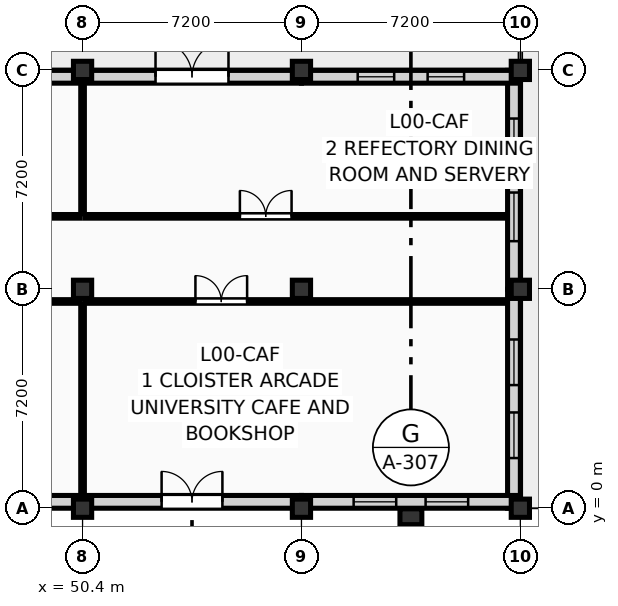
"""IFC4 building model, lengths in metres.
Left out: names, types, materials, properties, quantities, classifications, styles, units other than length and angle.
Written with IfcOpenShell. Run it as: python <this file> out.ifc"""

import sys

from ifc_helpers import new_model, si_unit, direction, frame, frame_2d, origin, origin_2d, place, context, subcontext, project, spatial, rectangle, extrude, element, fill, save


model = new_model("IFC4")
c1 = context("Model", 3, precision=1e-05, world=origin(), true_north=direction((0.0, 1.0)))
c2 = subcontext(c1, "Body", "Model", "MODEL_VIEW")
j1 = project(units=[si_unit("LENGTHUNIT", "METRE"), si_unit("PLANEANGLEUNIT", "RADIAN")], contexts=[c1])
p1 = place(None, origin())
s1 = spatial("IfcSite", under=j1, at=p1, CompositionType="ELEMENT")
p2 = place(p1, origin())
s2 = spatial("IfcBuilding", under=s1, at=p2, CompositionType="ELEMENT")
p3 = place(p2, origin())
s3 = spatial("IfcBuildingStorey", under=s2, at=p3, CompositionType="ELEMENT", Elevation=0.0)
for number, where, z_axis, x_axis in (
    (1, (50.4, 0.0, 0.0), (0.0, 0.0, 1.0), (1.0, 0.0, 0.0)),
    (2, (50.4, 7.2, 0.0), (0.0, 0.0, 1.0), (1.0, 0.0, 0.0)),
    (3, (50.4, 14.4, 0.0), (0.0, 0.0, 1.0), (1.0, 0.0, 0.0)),
    (4, (57.6, 0.0, 0.0), (0.0, 0.0, 1.0), (1.0, 0.0, 0.0)),
    (5, (57.6, 7.2, 0.0), (0.0, 0.0, 1.0), (1.0, 0.0, 0.0)),
    (6, (57.6, 14.4, 0.0), (0.0, 0.0, 1.0), (1.0, 0.0, 0.0)),
    (7, (64.8, 0.0, 0.0), (0.0, 0.0, 1.0), (1.0, 0.0, 0.0)),
    (8, (64.8, 7.2, 0.0), (0.0, 0.0, 1.0), (1.0, 0.0, 0.0)),
    (9, (64.8, 14.4, 0.0), (0.0, 0.0, 1.0), (1.0, 0.0, 0.0)),
):
    element("IfcColumn", number, at=place(p3, frame(where, z_axis=z_axis, x_axis=x_axis)), inside=s3, PredefinedType="COLUMN", context=c2, shape_type="SweptSolid", body=[
        extrude(rectangle(XDim=0.6, YDim=0.6, at=origin_2d()), origin(), (0.0, 0.0, 1.0), 4.5),
    ])
p4 = place(p3, frame((61.2, -0.28, 0.0), z_axis=(0.0, 0.0, 1.0), x_axis=(0.0, 1.0, 0.0)))
e10 = element("IfcColumn", 10, at=p4, inside=s3, PredefinedType="PILASTER", context=c2, shape_type="SweptSolid", body=[
    extrude(rectangle(XDim=0.52, YDim=0.72, at=origin_2d()), origin(), (0.0, 0.0, 1.0), 4.5),
])
p5 = place(p3, frame((64.59, 7.2, 0.0), z_axis=(0.0, 0.0, 1.0), x_axis=(0.0, 1.0, 0.0)))
e11 = element("IfcWall", 11, at=p5, inside=s3, PredefinedType="SOLIDWALL", context=c2, shape_type="SweptSolid", body=[
    extrude(rectangle(XDim=7.2, YDim=0.42, at=frame_2d((3.6, 0.0))), origin(), (0.0, 0.0, 1.0), 3.62),
])
p6 = place(p5, frame((1.583, 0.0, 0.45)))
e12 = element("IfcOpeningElement", 12, at=p6, cuts=e11, PredefinedType="OPENING", context=c2, shape_type="SweptSolid", body=[
    extrude(rectangle(XDim=1.6, YDim=2.65, at=frame_2d((0.8, 1.325))), frame((0.0, 0.222, 0.0), z_axis=(0.0, -1.0, 0.0), x_axis=(1.0, 0.0, 0.0)), (0.0, 0.0, 1.0), 0.444),
])
p7 = place(p5, frame((4.017, 0.0, 0.45)))
e13 = element("IfcOpeningElement", 13, at=p7, cuts=e11, PredefinedType="OPENING", context=c2, shape_type="SweptSolid", body=[
    extrude(rectangle(XDim=1.6, YDim=2.65, at=frame_2d((0.8, 1.325))), frame((0.0, 0.222, 0.0), z_axis=(0.0, -1.0, 0.0), x_axis=(1.0, 0.0, 0.0)), (0.0, 0.0, 1.0), 0.444),
])
p8 = place(p3, frame((64.59, 0.0, 0.0), z_axis=(0.0, 0.0, 1.0), x_axis=(0.0, 1.0, 0.0)))
e14 = element("IfcWall", 14, at=p8, inside=s3, PredefinedType="SOLIDWALL", context=c2, shape_type="SweptSolid", body=[
    extrude(rectangle(XDim=7.2, YDim=0.42, at=frame_2d((3.6, 0.0))), origin(), (0.0, 0.0, 1.0), 3.62),
])
p9 = place(p8, frame((1.65, 0.0, 0.45)))
e15 = element("IfcOpeningElement", 15, at=p9, cuts=e14, PredefinedType="OPENING", context=c2, shape_type="SweptSolid", body=[
    extrude(rectangle(XDim=1.5, YDim=2.6, at=frame_2d((0.75, 1.3))), frame((0.0, 0.222, 0.0), z_axis=(0.0, -1.0, 0.0), x_axis=(1.0, 0.0, 0.0)), (0.0, 0.0, 1.0), 0.444),
])
p10 = place(p8, frame((4.05, 0.0, 0.45)))
e16 = element("IfcOpeningElement", 16, at=p10, cuts=e14, PredefinedType="OPENING", context=c2, shape_type="SweptSolid", body=[
    extrude(rectangle(XDim=1.5, YDim=2.6, at=frame_2d((0.75, 1.3))), frame((0.0, 0.222, 0.0), z_axis=(0.0, -1.0, 0.0), x_axis=(1.0, 0.0, 0.0)), (0.0, 0.0, 1.0), 0.444),
])
p11 = place(p3, frame((57.6, 0.21, 0.0), z_axis=(0.0, 0.0, 1.0), x_axis=(1.0, 0.0, 0.0)))
e17 = element("IfcWall", 17, at=p11, inside=s3, PredefinedType="SOLIDWALL", context=c2, shape_type="SweptSolid", body=[
    extrude(rectangle(XDim=7.2, YDim=0.42, at=frame_2d((3.6, 0.0))), origin(), (0.0, 0.0, 1.0), 3.62),
])
p12 = place(p11, frame((1.717, 0.0, 0.45)))
e18 = element("IfcOpeningElement", 18, at=p12, cuts=e17, PredefinedType="OPENING", context=c2, shape_type="SweptSolid", body=[
    extrude(rectangle(XDim=1.4, YDim=2.55, at=frame_2d((0.7, 1.275))), frame((0.0, 0.222, 0.0), z_axis=(0.0, -1.0, 0.0), x_axis=(1.0, 0.0, 0.0)), (0.0, 0.0, 1.0), 0.444),
])
p13 = place(p11, frame((4.083, 0.0, 0.45)))
e19 = element("IfcOpeningElement", 19, at=p13, cuts=e17, PredefinedType="OPENING", context=c2, shape_type="SweptSolid", body=[
    extrude(rectangle(XDim=1.4, YDim=2.55, at=frame_2d((0.7, 1.275))), frame((0.0, 0.222, 0.0), z_axis=(0.0, -1.0, 0.0), x_axis=(1.0, 0.0, 0.0)), (0.0, 0.0, 1.0), 0.444),
])
p14 = place(p3, frame((50.4, 0.21, 0.0), z_axis=(0.0, 0.0, 1.0), x_axis=(1.0, 0.0, 0.0)))
e20 = element("IfcWall", 20, at=p14, inside=s3, PredefinedType="SOLIDWALL", context=c2, shape_type="SweptSolid", body=[
    extrude(rectangle(XDim=7.2, YDim=0.42, at=frame_2d((3.6, 0.0))), origin(), (0.0, 0.0, 1.0), 3.62),
])
p15 = place(p14, frame((2.6, 0.0, 0.0)))
e21 = element("IfcOpeningElement", 21, at=p15, cuts=e20, PredefinedType="OPENING", context=c2, shape_type="SweptSolid", body=[
    extrude(rectangle(XDim=2.0, YDim=2.4, at=frame_2d((1.0, 1.2))), frame((0.0, 0.222, 0.0), z_axis=(0.0, -1.0, 0.0), x_axis=(1.0, 0.0, 0.0)), (0.0, 0.0, 1.0), 0.444),
])
p16 = place(p3, frame((43.2, 0.21, 0.0), z_axis=(0.0, 0.0, 1.0), x_axis=(1.0, 0.0, 0.0)))
e22 = element("IfcWall", 22, at=p16, inside=s3, PredefinedType="SOLIDWALL", context=c2, shape_type="SweptSolid", body=[
    extrude(rectangle(XDim=7.2, YDim=0.42, at=frame_2d((3.6, 0.0))), origin(), (0.0, 0.0, 1.0), 3.62),
])
p17 = place(p16, frame((1.55, 0.0, 0.45)))
e23 = element("IfcOpeningElement", 23, at=p17, cuts=e22, PredefinedType="OPENING", context=c2, shape_type="SweptSolid", body=[
    extrude(rectangle(XDim=1.65, YDim=2.6, at=frame_2d((0.825, 1.3))), frame((0.0, 0.222, 0.0), z_axis=(0.0, -1.0, 0.0), x_axis=(1.0, 0.0, 0.0)), (0.0, 0.0, 1.0), 0.444),
])
p18 = place(p16, frame((4.0, 0.0, 0.45)))
e24 = element("IfcOpeningElement", 24, at=p18, cuts=e22, PredefinedType="OPENING", context=c2, shape_type="SweptSolid", body=[
    extrude(rectangle(XDim=1.65, YDim=2.6, at=frame_2d((0.825, 1.3))), frame((0.0, 0.222, 0.0), z_axis=(0.0, -1.0, 0.0), x_axis=(1.0, 0.0, 0.0)), (0.0, 0.0, 1.0), 0.444),
])
p19 = place(p3, frame((43.2, 14.19, 0.0), z_axis=(0.0, 0.0, 1.0), x_axis=(1.0, 0.0, 0.0)))
e25 = element("IfcWall", 25, at=p19, inside=s3, PredefinedType="SOLIDWALL", context=c2, shape_type="SweptSolid", body=[
    extrude(rectangle(XDim=7.2, YDim=0.42, at=frame_2d((3.6, 0.0))), origin(), (0.0, 0.0, 1.0), 3.62),
])
p20 = place(p19, frame((1.717, 0.0, 0.45)))
e26 = element("IfcOpeningElement", 26, at=p20, cuts=e25, PredefinedType="OPENING", context=c2, shape_type="SweptSolid", body=[
    extrude(rectangle(XDim=1.4, YDim=2.38, at=frame_2d((0.7, 1.19))), frame((0.0, 0.222, 0.0), z_axis=(0.0, -1.0, 0.0), x_axis=(1.0, 0.0, 0.0)), (0.0, 0.0, 1.0), 0.444),
])
p21 = place(p19, frame((4.083, 0.0, 0.45)))
e27 = element("IfcOpeningElement", 27, at=p21, cuts=e25, PredefinedType="OPENING", context=c2, shape_type="SweptSolid", body=[
    extrude(rectangle(XDim=1.4, YDim=2.38, at=frame_2d((0.7, 1.19))), frame((0.0, 0.222, 0.0), z_axis=(0.0, -1.0, 0.0), x_axis=(1.0, 0.0, 0.0)), (0.0, 0.0, 1.0), 0.444),
])
p22 = place(p3, frame((50.4, 14.19, 0.0), z_axis=(0.0, 0.0, 1.0), x_axis=(1.0, 0.0, 0.0)))
e28 = element("IfcWall", 28, at=p22, inside=s3, PredefinedType="SOLIDWALL", context=c2, shape_type="SweptSolid", body=[
    extrude(rectangle(XDim=7.2, YDim=0.42, at=frame_2d((3.6, 0.0))), origin(), (0.0, 0.0, 1.0), 3.62),
])
p23 = place(p22, frame((2.4, 0.0, 0.0)))
e29 = element("IfcOpeningElement", 29, at=p23, cuts=e28, PredefinedType="OPENING", context=c2, shape_type="SweptSolid", body=[
    extrude(rectangle(XDim=2.4, YDim=2.6, at=frame_2d((1.2, 1.3))), frame((0.0, 0.222, 0.0), z_axis=(0.0, -1.0, 0.0), x_axis=(1.0, 0.0, 0.0)), (0.0, 0.0, 1.0), 0.444),
])
p24 = place(p3, frame((57.6, 14.19, 0.0), z_axis=(0.0, 0.0, 1.0), x_axis=(1.0, 0.0, 0.0)))
e30 = element("IfcWall", 30, at=p24, inside=s3, PredefinedType="SOLIDWALL", context=c2, shape_type="SweptSolid", body=[
    extrude(rectangle(XDim=7.2, YDim=0.42, at=frame_2d((3.6, 0.0))), origin(), (0.0, 0.0, 1.0), 3.62),
])
p25 = place(p24, frame((1.85, 0.0, 0.45)))
e31 = element("IfcOpeningElement", 31, at=p25, cuts=e30, PredefinedType="OPENING", context=c2, shape_type="SweptSolid", body=[
    extrude(rectangle(XDim=1.2, YDim=2.35, at=frame_2d((0.6, 1.175))), frame((0.0, 0.222, 0.0), z_axis=(0.0, -1.0, 0.0), x_axis=(1.0, 0.0, 0.0)), (0.0, 0.0, 1.0), 0.444),
])
p26 = place(p24, frame((4.15, 0.0, 0.45)))
e32 = element("IfcOpeningElement", 32, at=p26, cuts=e30, PredefinedType="OPENING", context=c2, shape_type="SweptSolid", body=[
    extrude(rectangle(XDim=1.2, YDim=2.35, at=frame_2d((0.6, 1.175))), frame((0.0, 0.222, 0.0), z_axis=(0.0, -1.0, 0.0), x_axis=(1.0, 0.0, 0.0)), (0.0, 0.0, 1.0), 0.444),
])
p27 = place(p3, frame((50.4, 0.48, 0.0), z_axis=(0.0, 0.0, 1.0), x_axis=(0.0, 1.0, 0.0)))
e33 = element("IfcWall", 33, at=p27, inside=s3, PredefinedType="PARTITIONING", context=c2, shape_type="SweptSolid", body=[
    extrude(rectangle(XDim=6.24, YDim=0.12, at=frame_2d((3.12, 0.0))), origin(), (0.0, 0.0, 1.0), 3.385),
])
p28 = place(p3, frame((28.88, 6.8, 0.0), z_axis=(0.0, 0.0, 1.0), x_axis=(1.0, 0.0, 0.0)))
e34 = element("IfcWall", 34, at=p28, inside=s3, PredefinedType="PARTITIONING", context=c2, shape_type="SweptSolid", body=[
    extrude(rectangle(XDim=21.44, YDim=0.12, at=frame_2d((10.72, 0.0))), origin(), (0.0, 0.0, 1.0), 3.485),
])
p29 = place(p28, frame((9.87, 0.0, 0.0)))
e35 = element("IfcOpeningElement", 35, at=p29, cuts=e34, PredefinedType="OPENING", context=c2, shape_type="SweptSolid", body=[
    extrude(rectangle(XDim=1.7, YDim=2.28, at=frame_2d((0.85, 1.14))), frame((0.0, 0.072, 0.0), z_axis=(0.0, -1.0, 0.0), x_axis=(1.0, 0.0, 0.0)), (0.0, 0.0, 1.0), 0.144),
])
p30 = place(p3, frame((28.88, 9.6, 0.0), z_axis=(0.0, 0.0, 1.0), x_axis=(1.0, 0.0, 0.0)))
e36 = element("IfcWall", 36, at=p30, inside=s3, PredefinedType="PARTITIONING", context=c2, shape_type="SweptSolid", body=[
    extrude(rectangle(XDim=21.44, YDim=0.12, at=frame_2d((10.72, 0.0))), origin(), (0.0, 0.0, 1.0), 4.235),
])
p31 = place(p30, frame((9.87, 0.0, 0.0)))
e37 = element("IfcOpeningElement", 37, at=p31, cuts=e36, PredefinedType="OPENING", context=c2, shape_type="SweptSolid", body=[
    extrude(rectangle(XDim=1.7, YDim=2.28, at=frame_2d((0.85, 1.14))), frame((0.0, 0.072, 0.0), z_axis=(0.0, -1.0, 0.0), x_axis=(1.0, 0.0, 0.0)), (0.0, 0.0, 1.0), 0.144),
])
p32 = place(p3, frame((50.4, 9.68, 0.0), z_axis=(0.0, 0.0, 1.0), x_axis=(0.0, 1.0, 0.0)))
e38 = element("IfcWall", 38, at=p32, inside=s3, PredefinedType="PARTITIONING", context=c2, shape_type="SweptSolid", body=[
    extrude(rectangle(XDim=4.24, YDim=0.12, at=frame_2d((2.12, 0.0))), origin(), (0.0, 0.0, 1.0), 3.385),
])
p33 = place(p3, frame((50.48, 6.8, 0.0), z_axis=(0.0, 0.0, 1.0), x_axis=(1.0, 0.0, 0.0)))
e39 = element("IfcWall", 39, at=p33, inside=s3, PredefinedType="PARTITIONING", context=c2, shape_type="SweptSolid", body=[
    extrude(rectangle(XDim=13.84, YDim=0.12, at=frame_2d((6.92, 0.0))), origin(), (0.0, 0.0, 1.0), 3.485),
])
p34 = place(p33, frame((3.633, 0.0, 0.0)))
e40 = element("IfcOpeningElement", 40, at=p34, cuts=e39, PredefinedType="OPENING", context=c2, shape_type="SweptSolid", body=[
    extrude(rectangle(XDim=1.7, YDim=2.28, at=frame_2d((0.85, 1.14))), frame((0.0, 0.072, 0.0), z_axis=(0.0, -1.0, 0.0), x_axis=(1.0, 0.0, 0.0)), (0.0, 0.0, 1.0), 0.144),
])
p35 = place(p3, frame((50.48, 9.6, 0.0), z_axis=(0.0, 0.0, 1.0), x_axis=(1.0, 0.0, 0.0)))
e41 = element("IfcWall", 41, at=p35, inside=s3, PredefinedType="PARTITIONING", context=c2, shape_type="SweptSolid", body=[
    extrude(rectangle(XDim=13.84, YDim=0.12, at=frame_2d((6.92, 0.0))), origin(), (0.0, 0.0, 1.0), 4.235),
])
p36 = place(p35, frame((5.095, 0.0, 0.0)))
e42 = element("IfcOpeningElement", 42, at=p36, cuts=e41, PredefinedType="OPENING", context=c2, shape_type="SweptSolid", body=[
    extrude(rectangle(XDim=1.7, YDim=2.28, at=frame_2d((0.85, 1.14))), frame((0.0, 0.072, 0.0), z_axis=(0.0, -1.0, 0.0), x_axis=(1.0, 0.0, 0.0)), (0.0, 0.0, 1.0), 0.144),
])
p37 = place(p6, origin())
e43 = element("IfcWindow", 43, at=p37, inside=s3, PartitioningType="SINGLE_PANEL", PredefinedType="WINDOW", context=c2, shape_type="SweptSolid", body=[
    extrude(rectangle(XDim=1.6, YDim=2.65, at=frame_2d((0.8, 1.325))), frame((0.0, 0.03, 0.0), z_axis=(0.0, -1.0, 0.0), x_axis=(1.0, 0.0, 0.0)), (0.0, 0.0, 1.0), 0.06),
])
fill(e12, e43)
p38 = place(p7, origin())
e44 = element("IfcWindow", 44, at=p38, inside=s3, PartitioningType="SINGLE_PANEL", PredefinedType="WINDOW", context=c2, shape_type="SweptSolid", body=[
    extrude(rectangle(XDim=1.6, YDim=2.65, at=frame_2d((0.8, 1.325))), frame((0.0, 0.03, 0.0), z_axis=(0.0, -1.0, 0.0), x_axis=(1.0, 0.0, 0.0)), (0.0, 0.0, 1.0), 0.06),
])
fill(e13, e44)
p39 = place(p9, origin())
e45 = element("IfcWindow", 45, at=p39, inside=s3, PartitioningType="SINGLE_PANEL", PredefinedType="WINDOW", context=c2, shape_type="SweptSolid", body=[
    extrude(rectangle(XDim=1.5, YDim=2.6, at=frame_2d((0.75, 1.3))), frame((0.0, 0.03, 0.0), z_axis=(0.0, -1.0, 0.0), x_axis=(1.0, 0.0, 0.0)), (0.0, 0.0, 1.0), 0.06),
])
fill(e15, e45)
p40 = place(p10, origin())
e46 = element("IfcWindow", 46, at=p40, inside=s3, PartitioningType="SINGLE_PANEL", PredefinedType="WINDOW", context=c2, shape_type="SweptSolid", body=[
    extrude(rectangle(XDim=1.5, YDim=2.6, at=frame_2d((0.75, 1.3))), frame((0.0, 0.03, 0.0), z_axis=(0.0, -1.0, 0.0), x_axis=(1.0, 0.0, 0.0)), (0.0, 0.0, 1.0), 0.06),
])
fill(e16, e46)
p41 = place(p12, origin())
e47 = element("IfcWindow", 47, at=p41, inside=s3, PartitioningType="SINGLE_PANEL", PredefinedType="WINDOW", context=c2, shape_type="SweptSolid", body=[
    extrude(rectangle(XDim=1.4, YDim=2.55, at=frame_2d((0.7, 1.275))), frame((0.0, 0.03, 0.0), z_axis=(0.0, -1.0, 0.0), x_axis=(1.0, 0.0, 0.0)), (0.0, 0.0, 1.0), 0.06),
])
fill(e18, e47)
p42 = place(p13, origin())
e48 = element("IfcWindow", 48, at=p42, inside=s3, PartitioningType="SINGLE_PANEL", PredefinedType="WINDOW", context=c2, shape_type="SweptSolid", body=[
    extrude(rectangle(XDim=1.4, YDim=2.55, at=frame_2d((0.7, 1.275))), frame((0.0, 0.03, 0.0), z_axis=(0.0, -1.0, 0.0), x_axis=(1.0, 0.0, 0.0)), (0.0, 0.0, 1.0), 0.06),
])
fill(e19, e48)
p43 = place(p15, origin())
e49 = element("IfcDoor", 49, at=p43, inside=s3, OperationType="DOUBLE_DOOR_SINGLE_SWING", PredefinedType="DOOR", context=c2, shape_type="SweptSolid", body=[
    extrude(rectangle(XDim=2.0, YDim=2.4, at=frame_2d((1.0, 1.2))), frame((0.0, 0.025, 0.0), z_axis=(0.0, -1.0, 0.0), x_axis=(1.0, 0.0, 0.0)), (0.0, 0.0, 1.0), 0.05),
])
fill(e21, e49)
p44 = place(p23, origin())
e50 = element("IfcDoor", 50, at=p44, inside=s3, OperationType="DOUBLE_DOOR_SINGLE_SWING", PredefinedType="DOOR", context=c2, shape_type="SweptSolid", body=[
    extrude(rectangle(XDim=2.4, YDim=2.6, at=frame_2d((1.2, 1.3))), frame((0.0, 0.025, 0.0), z_axis=(0.0, -1.0, 0.0), x_axis=(1.0, 0.0, 0.0)), (0.0, 0.0, 1.0), 0.05),
])
fill(e29, e50)
p45 = place(p25, origin())
e51 = element("IfcWindow", 51, at=p45, inside=s3, PartitioningType="SINGLE_PANEL", PredefinedType="WINDOW", context=c2, shape_type="SweptSolid", body=[
    extrude(rectangle(XDim=1.2, YDim=2.35, at=frame_2d((0.6, 1.175))), frame((0.0, 0.03, 0.0), z_axis=(0.0, -1.0, 0.0), x_axis=(1.0, 0.0, 0.0)), (0.0, 0.0, 1.0), 0.06),
])
fill(e31, e51)
p46 = place(p26, origin())
e52 = element("IfcWindow", 52, at=p46, inside=s3, PartitioningType="SINGLE_PANEL", PredefinedType="WINDOW", context=c2, shape_type="SweptSolid", body=[
    extrude(rectangle(XDim=1.2, YDim=2.35, at=frame_2d((0.6, 1.175))), frame((0.0, 0.03, 0.0), z_axis=(0.0, -1.0, 0.0), x_axis=(1.0, 0.0, 0.0)), (0.0, 0.0, 1.0), 0.06),
])
fill(e32, e52)
p47 = place(p34, origin())
e53 = element("IfcDoor", 53, at=p47, inside=s3, OperationType="DOUBLE_DOOR_SINGLE_SWING", PredefinedType="DOOR", context=c2, shape_type="SweptSolid", body=[
    extrude(rectangle(XDim=1.7, YDim=2.28, at=frame_2d((0.85, 1.14))), frame((0.0, 0.025, 0.0), z_axis=(0.0, -1.0, 0.0), x_axis=(1.0, 0.0, 0.0)), (0.0, 0.0, 1.0), 0.05),
])
fill(e40, e53)
p48 = place(p36, origin())
e54 = element("IfcDoor", 54, at=p48, inside=s3, OperationType="DOUBLE_DOOR_SINGLE_SWING", PredefinedType="DOOR", context=c2, shape_type="SweptSolid", body=[
    extrude(rectangle(XDim=1.7, YDim=2.28, at=frame_2d((0.85, 1.14))), frame((0.0, 0.025, 0.0), z_axis=(0.0, -1.0, 0.0), x_axis=(1.0, 0.0, 0.0)), (0.0, 0.0, 1.0), 0.05),
])
fill(e42, e54)
save(model, sys.argv[1])
